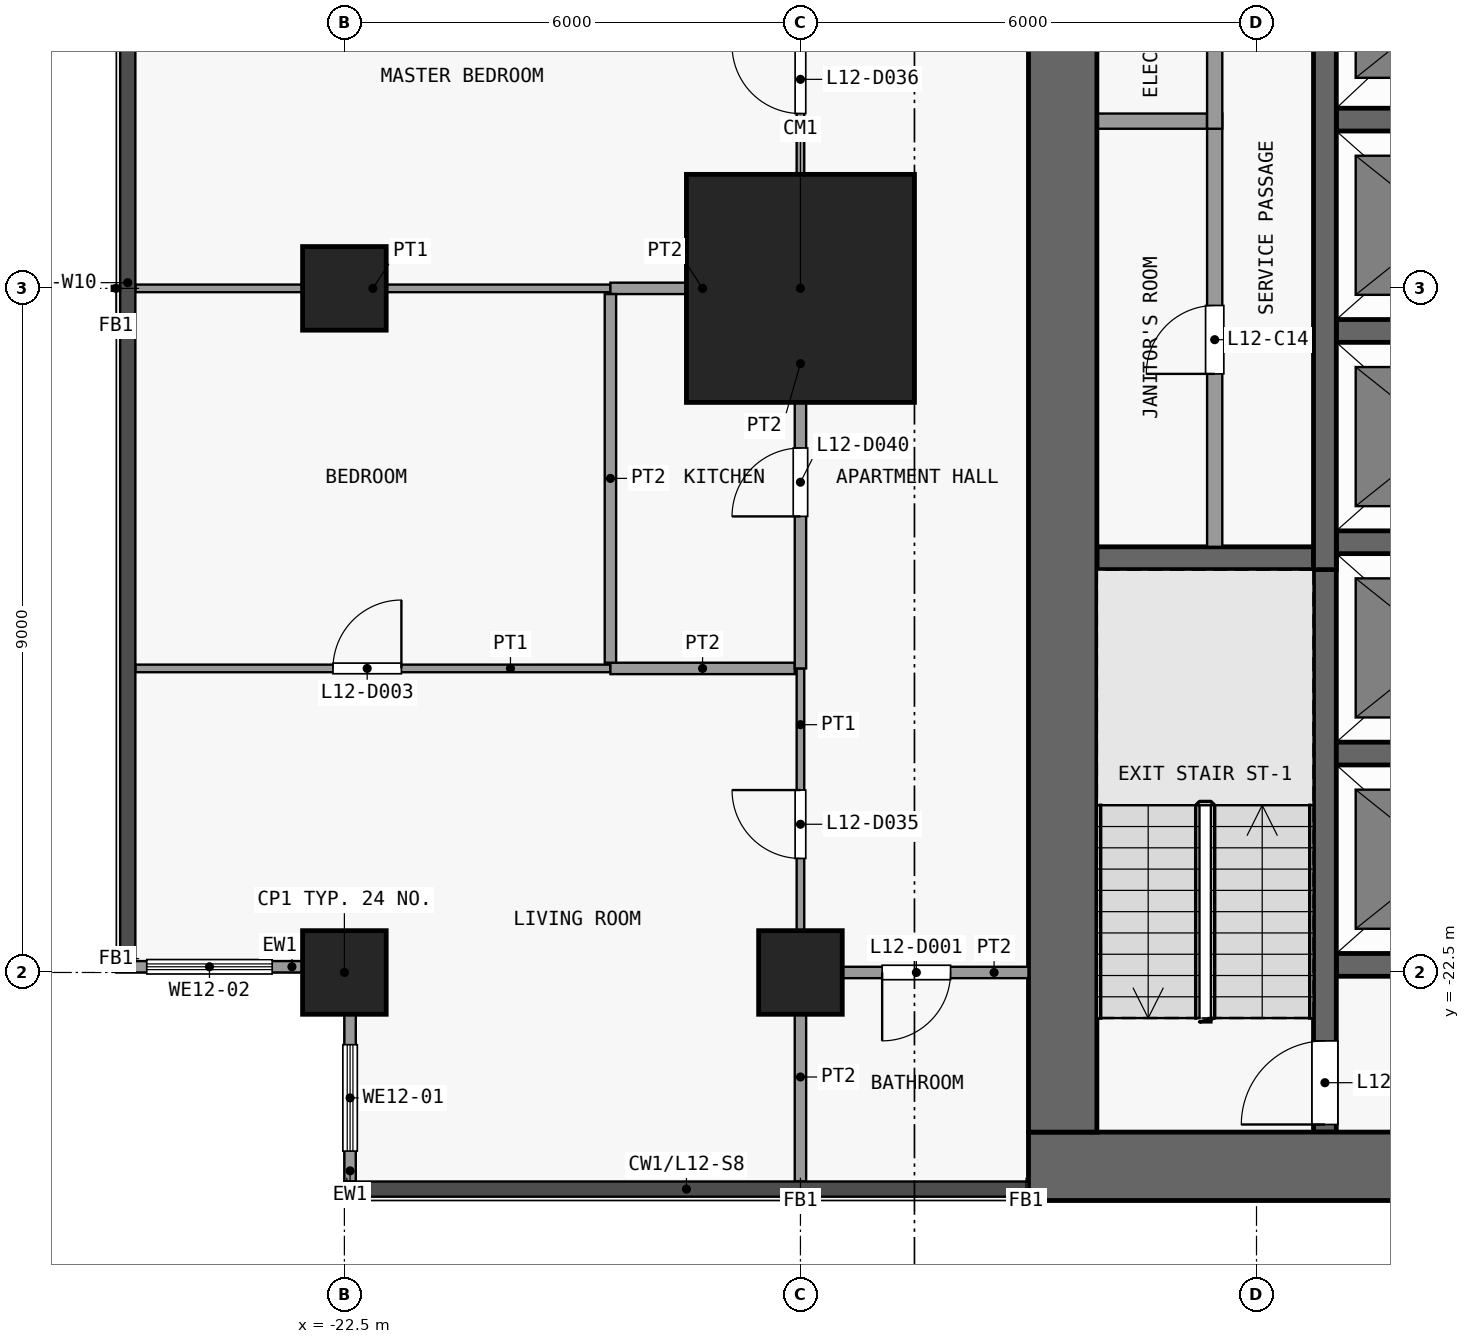
"""IFC4 building model, lengths in metres.
Left out: names, types, materials, properties, quantities, classifications, styles, units other than length and angle.
Written with IfcOpenShell. Run it as: python <this file> out.ifc"""

import sys

from ifc_helpers import new_model, si_unit, direction, frame, frame_2d, origin, origin_2d, place, context, subcontext, project, spatial, rectangle, extrude, element, fill, save


model = new_model("IFC4")
c1 = context("Model", 3, precision=1e-05, world=origin(), true_north=direction((0.0, 1.0)))
c2 = subcontext(c1, "Body", "Model", "MODEL_VIEW")
j1 = project(units=[si_unit("LENGTHUNIT", "METRE"), si_unit("PLANEANGLEUNIT", "RADIAN")], contexts=[c1])
p1 = place(None, origin())
s1 = spatial("IfcSite", under=j1, at=p1, CompositionType="ELEMENT")
p2 = place(p1, origin())
s2 = spatial("IfcBuilding", under=s1, at=p2, CompositionType="ELEMENT")
p3 = place(p2, frame((0.0, 0.0, 54.1)))
s3 = spatial("IfcBuildingStorey", under=s2, at=p3, CompositionType="ELEMENT", Elevation=54.1)
for number, where, z_axis, x_axis in (
    (1, (-22.5, -22.5, 0.0), (0.0, 0.0, 1.0), (1.0, 0.0, 0.0)),
    (2, (-22.5, -13.5, 0.0), (0.0, 0.0, 1.0), (1.0, 0.0, 0.0)),
    (3, (-16.5, -22.5, 0.0), (0.0, 0.0, 1.0), (1.0, 0.0, 0.0)),
):
    element("IfcColumn", number, at=place(p3, frame(where, z_axis=z_axis, x_axis=x_axis)), inside=s3, PredefinedType="COLUMN", context=c2, shape_type="SweptSolid", body=[
        extrude(rectangle(XDim=1.1, YDim=1.1, at=origin_2d()), origin(), (0.0, 0.0, 1.0), 3.6),
    ])
p4 = place(p3, frame((-16.5, -13.5, 0.0), z_axis=(0.0, 0.0, 1.0), x_axis=(1.0, 0.0, 0.0)))
e4 = element("IfcColumn", 4, at=p4, inside=s3, PredefinedType="COLUMN", context=c2, shape_type="SweptSolid", body=[
    extrude(rectangle(XDim=3.0, YDim=3.0, at=origin_2d()), origin(), (0.0, 0.0, 1.0), 3.6),
])
p5 = place(p3, frame((-13.5, -25.05, 0.0), z_axis=(0.0, 0.0, 1.0), x_axis=(1.0, 0.0, 0.0)))
e5 = element("IfcWall", 5, at=p5, inside=s3, PredefinedType="SHEAR", context=c2, shape_type="SweptSolid", body=[
    extrude(rectangle(XDim=27.0, YDim=0.9, at=frame_2d((13.5, 0.0))), origin(), (0.0, 0.0, 1.0), 3.3),
])
p6 = place(p3, frame((-13.05, -24.6, 0.0), z_axis=(0.0, 0.0, 1.0), x_axis=(0.0, 1.0, 0.0)))
e6 = element("IfcWall", 6, at=p6, inside=s3, PredefinedType="SHEAR", context=c2, shape_type="SweptSolid", body=[
    extrude(rectangle(XDim=16.1, YDim=0.9, at=frame_2d((8.05, 0.0))), origin(), (0.0, 0.0, 1.0), 3.3),
])
for number, where, z_axis, x_axis in (
    (7, (-9.45, -22.4, 0.0), (0.0, 0.0, 1.0), (1.0, 0.0, 0.0)),
    (8, (-9.45, -19.62, 0.0), (0.0, 0.0, 1.0), (1.0, 0.0, 0.0)),
):
    element("IfcWall", number, at=place(p3, frame(where, z_axis=z_axis, x_axis=x_axis)), inside=s3, PredefinedType="SHEAR", context=c2, shape_type="SweptSolid", body=[
        extrude(rectangle(XDim=2.8, YDim=0.3, at=frame_2d((1.4, 0.0))), origin(), (0.0, 0.0, 1.0), 3.3),
    ])
p7 = place(p3, frame((-12.6, -17.05, 0.0), z_axis=(0.0, 0.0, 1.0), x_axis=(1.0, 0.0, 0.0)))
e9 = element("IfcWall", 9, at=p7, inside=s3, PredefinedType="SHEAR", context=c2, shape_type="SweptSolid", body=[
    extrude(rectangle(XDim=2.85, YDim=0.3, at=frame_2d((1.425, 0.0))), origin(), (0.0, 0.0, 1.0), 3.3),
])
for number, where, z_axis, x_axis in (
    (10, (-9.45, -16.84, 0.0), (0.0, 0.0, 1.0), (1.0, 0.0, 0.0)),
    (11, (-9.45, -14.06, 0.0), (0.0, 0.0, 1.0), (1.0, 0.0, 0.0)),
):
    element("IfcWall", number, at=place(p3, frame(where, z_axis=z_axis, x_axis=x_axis)), inside=s3, PredefinedType="SHEAR", context=c2, shape_type="SweptSolid", body=[
        extrude(rectangle(XDim=2.8, YDim=0.3, at=frame_2d((1.4, 0.0))), origin(), (0.0, 0.0, 1.0), 3.3),
    ])
p8 = place(p3, frame((-12.6, -11.3, 0.0), z_axis=(0.0, 0.0, 1.0), x_axis=(1.0, 0.0, 0.0)))
e12 = element("IfcWall", 12, at=p8, inside=s3, PredefinedType="PARTITIONING", context=c2, shape_type="SweptSolid", body=[
    extrude(rectangle(XDim=1.45, YDim=0.2, at=frame_2d((0.725, 0.0))), origin(), (0.0, 0.0, 1.0), 3.3),
])
p9 = place(p3, frame((-9.45, -11.28, 0.0), z_axis=(0.0, 0.0, 1.0), x_axis=(1.0, 0.0, 0.0)))
e13 = element("IfcWall", 13, at=p9, inside=s3, PredefinedType="SHEAR", context=c2, shape_type="SweptSolid", body=[
    extrude(rectangle(XDim=2.8, YDim=0.3, at=frame_2d((1.4, 0.0))), origin(), (0.0, 0.0, 1.0), 3.3),
])
p10 = place(p3, frame((-11.05, -16.9, 0.0), z_axis=(0.0, 0.0, 1.0), x_axis=(0.0, 1.0, 0.0)))
e14 = element("IfcWall", 14, at=p10, inside=s3, PredefinedType="PARTITIONING", context=c2, shape_type="SweptSolid", body=[
    extrude(rectangle(XDim=5.7, YDim=0.2, at=frame_2d((2.85, 0.0))), origin(), (0.0, 0.0, 1.0), 3.3),
])
p11 = place(p10, frame((2.275, 0.0, 0.0)))
e15 = element("IfcOpeningElement", 15, at=p11, cuts=e14, PredefinedType="OPENING", context=c2, shape_type="SweptSolid", body=[
    extrude(rectangle(XDim=0.9, YDim=2.1, at=frame_2d((0.45, 1.05))), frame((0.0, 0.11, 0.0), z_axis=(0.0, -1.0, 0.0), x_axis=(1.0, 0.0, 0.0)), (0.0, 0.0, 1.0), 0.22),
])
p12 = place(p3, frame((-11.05, -11.4, 0.0), z_axis=(0.0, 0.0, 1.0), x_axis=(0.0, 1.0, 0.0)))
e16 = element("IfcWall", 16, at=p12, inside=s3, PredefinedType="PARTITIONING", context=c2, shape_type="SweptSolid", body=[
    extrude(rectangle(XDim=2.9, YDim=0.2, at=frame_2d((1.45, 0.0))), origin(), (0.0, 0.0, 1.0), 3.3),
])
p13 = place(p12, frame((1.05, 0.0, 0.0)))
e17 = element("IfcOpeningElement", 17, at=p13, cuts=e16, PredefinedType="OPENING", context=c2, shape_type="SweptSolid", body=[
    extrude(rectangle(XDim=0.9, YDim=2.1, at=frame_2d((0.45, 1.05))), frame((0.0, 0.11, 0.0), z_axis=(0.0, -1.0, 0.0), x_axis=(1.0, 0.0, 0.0)), (0.0, 0.0, 1.0), 0.22),
])
p14 = place(p3, frame((-9.6, -24.6, 0.0), z_axis=(0.0, 0.0, 1.0), x_axis=(0.0, 1.0, 0.0)))
e18 = element("IfcWall", 18, at=p14, inside=s3, PredefinedType="SHEAR", context=c2, shape_type="SweptSolid", body=[
    extrude(rectangle(XDim=7.7, YDim=0.3, at=frame_2d((3.85, 0.0))), origin(), (0.0, 0.0, 1.0), 3.3),
])
p15 = place(p14, frame((0.1, 0.0, 0.0)))
e19 = element("IfcOpeningElement", 19, at=p15, cuts=e18, PredefinedType="OPENING", context=c2, shape_type="SweptSolid", body=[
    extrude(rectangle(XDim=1.1, YDim=2.1, at=frame_2d((0.55, 1.05))), frame((0.0, 0.16, 0.0), z_axis=(0.0, -1.0, 0.0), x_axis=(1.0, 0.0, 0.0)), (0.0, 0.0, 1.0), 0.32),
])
p16 = place(p3, frame((-9.6, -17.2, 0.0), z_axis=(0.0, 0.0, 1.0), x_axis=(0.0, 1.0, 0.0)))
e20 = element("IfcWall", 20, at=p16, inside=s3, PredefinedType="SHEAR", context=c2, shape_type="SweptSolid", body=[
    extrude(rectangle(XDim=8.7, YDim=0.3, at=frame_2d((4.35, 0.0))), origin(), (0.0, 0.0, 1.0), 3.3),
])
p17 = place(p3, frame((-22.425, -25.25, 0.0), z_axis=(0.0, 0.0, 1.0), x_axis=(0.0, 1.0, 0.0)))
e21 = element("IfcWall", 21, at=p17, inside=s3, PredefinedType="SOLIDWALL", context=c2, shape_type="SweptSolid", body=[
    extrude(rectangle(XDim=2.2, YDim=0.15, at=frame_2d((1.1, 0.0))), origin(), (0.0, 0.0, 1.0), 3.3),
])
p18 = place(p17, frame((0.4, 0.0, 0.9)))
e22 = element("IfcOpeningElement", 22, at=p18, cuts=e21, PredefinedType="OPENING", context=c2, shape_type="SweptSolid", body=[
    extrude(rectangle(XDim=1.4, YDim=2.4, at=frame_2d((0.7, 1.2))), frame((0.0, 0.085, 0.0), z_axis=(0.0, -1.0, 0.0), x_axis=(1.0, 0.0, 0.0)), (0.0, 0.0, 1.0), 0.17),
])
p19 = place(p3, frame((-23.05, -22.425, 0.0), z_axis=(0.0, 0.0, 1.0), x_axis=(-1.0, 0.0, 0.0)))
e23 = element("IfcWall", 23, at=p19, inside=s3, PredefinedType="SOLIDWALL", context=c2, shape_type="SweptSolid", body=[
    extrude(rectangle(XDim=2.45, YDim=0.15, at=frame_2d((1.225, 0.0))), origin(), (0.0, 0.0, 1.0), 3.3),
])
p20 = place(p19, frame((0.4, 0.0, 0.9)))
e24 = element("IfcOpeningElement", 24, at=p20, cuts=e23, PredefinedType="OPENING", context=c2, shape_type="SweptSolid", body=[
    extrude(rectangle(XDim=1.65, YDim=2.4, at=frame_2d((0.825, 1.2))), frame((0.0, 0.085, 0.0), z_axis=(0.0, -1.0, 0.0), x_axis=(1.0, 0.0, 0.0)), (0.0, 0.0, 1.0), 0.17),
])
p21 = place(p3, frame((-16.425, -22.5, 0.0), z_axis=(0.0, 0.0, 1.0), x_axis=(1.0, 0.0, 0.0)))
e25 = element("IfcWall", 25, at=p21, inside=s3, PredefinedType="PARTITIONING", context=c2, shape_type="SweptSolid", body=[
    extrude(rectangle(XDim=2.925, YDim=0.15, at=frame_2d((1.462, 0.0))), origin(), (0.0, 0.0, 1.0), 3.3),
])
p22 = place(p21, frame((1.0, 0.0, 0.0)))
e26 = element("IfcOpeningElement", 26, at=p22, cuts=e25, PredefinedType="OPENING", context=c2, shape_type="SweptSolid", body=[
    extrude(rectangle(XDim=0.9, YDim=2.1, at=frame_2d((0.45, 1.05))), frame((0.0, 0.085, 0.0), z_axis=(0.0, -1.0, 0.0), x_axis=(1.0, 0.0, 0.0)), (0.0, 0.0, 1.0), 0.17),
])
p23 = place(p3, frame((-25.25, -18.5, 0.0), z_axis=(0.0, 0.0, 1.0), x_axis=(1.0, 0.0, 0.0)))
e27 = element("IfcWall", 27, at=p23, inside=s3, PredefinedType="PARTITIONING", context=c2, shape_type="SweptSolid", body=[
    extrude(rectangle(XDim=6.25, YDim=0.1, at=frame_2d((3.125, 0.0))), origin(), (0.0, 0.0, 1.0), 3.3),
])
p24 = place(p23, frame((2.6, 0.0, 0.0)))
e28 = element("IfcOpeningElement", 28, at=p24, cuts=e27, PredefinedType="OPENING", context=c2, shape_type="SweptSolid", body=[
    extrude(rectangle(XDim=0.9, YDim=2.1, at=frame_2d((0.45, 1.05))), frame((0.0, 0.06, 0.0), z_axis=(0.0, -1.0, 0.0), x_axis=(1.0, 0.0, 0.0)), (0.0, 0.0, 1.0), 0.12),
])
p25 = place(p3, frame((-19.0, -18.5, 0.0), z_axis=(0.0, 0.0, 1.0), x_axis=(1.0, 0.0, 0.0)))
e29 = element("IfcWall", 29, at=p25, inside=s3, PredefinedType="PARTITIONING", context=c2, shape_type="SweptSolid", body=[
    extrude(rectangle(XDim=2.425, YDim=0.15, at=frame_2d((1.212, 0.0))), origin(), (0.0, 0.0, 1.0), 3.3),
])
p26 = place(p3, frame((-25.25, -13.5, 0.0), z_axis=(0.0, 0.0, 1.0), x_axis=(1.0, 0.0, 0.0)))
e30 = element("IfcWall", 30, at=p26, inside=s3, PredefinedType="PARTITIONING", context=c2, shape_type="SweptSolid", body=[
    extrude(rectangle(XDim=6.25, YDim=0.1, at=frame_2d((3.125, 0.0))), origin(), (0.0, 0.0, 1.0), 3.3),
])
p27 = place(p3, frame((-19.0, -13.5, 0.0), z_axis=(0.0, 0.0, 1.0), x_axis=(1.0, 0.0, 0.0)))
e31 = element("IfcWall", 31, at=p27, inside=s3, PredefinedType="PARTITIONING", context=c2, shape_type="SweptSolid", body=[
    extrude(rectangle(XDim=2.425, YDim=0.15, at=frame_2d((1.212, 0.0))), origin(), (0.0, 0.0, 1.0), 3.3),
])
p28 = place(p3, frame((-19.0, -18.425, 0.0), z_axis=(0.0, 0.0, 1.0), x_axis=(0.0, 1.0, 0.0)))
e32 = element("IfcWall", 32, at=p28, inside=s3, PredefinedType="PARTITIONING", context=c2, shape_type="SweptSolid", body=[
    extrude(rectangle(XDim=4.85, YDim=0.15, at=frame_2d((2.425, 0.0))), origin(), (0.0, 0.0, 1.0), 3.3),
])
p29 = place(p3, frame((-16.5, -22.5, 0.0), z_axis=(0.0, 0.0, 1.0), x_axis=(0.0, 1.0, 0.0)))
e33 = element("IfcWall", 33, at=p29, inside=s3, PredefinedType="PARTITIONING", context=c2, shape_type="SweptSolid", body=[
    extrude(rectangle(XDim=4.0, YDim=0.1, at=frame_2d((2.0, 0.0))), origin(), (0.0, 0.0, 1.0), 3.3),
])
p30 = place(p29, frame((1.5, 0.0, 0.0)))
e34 = element("IfcOpeningElement", 34, at=p30, cuts=e33, PredefinedType="OPENING", context=c2, shape_type="SweptSolid", body=[
    extrude(rectangle(XDim=0.9, YDim=2.1, at=frame_2d((0.45, 1.05))), frame((0.0, 0.06, 0.0), z_axis=(0.0, -1.0, 0.0), x_axis=(1.0, 0.0, 0.0)), (0.0, 0.0, 1.0), 0.12),
])
p31 = place(p3, frame((-16.5, -13.5, 0.0), z_axis=(0.0, 0.0, 1.0), x_axis=(0.0, 1.0, 0.0)))
e35 = element("IfcWall", 35, at=p31, inside=s3, PredefinedType="PARTITIONING", context=c2, shape_type="SweptSolid", body=[
    extrude(rectangle(XDim=5.5, YDim=0.1, at=frame_2d((2.75, 0.0))), origin(), (0.0, 0.0, 1.0), 3.3),
])
p32 = place(p31, frame((2.3, 0.0, 0.0)))
e36 = element("IfcOpeningElement", 36, at=p32, cuts=e35, PredefinedType="OPENING", context=c2, shape_type="SweptSolid", body=[
    extrude(rectangle(XDim=0.9, YDim=2.1, at=frame_2d((0.45, 1.05))), frame((0.0, 0.06, 0.0), z_axis=(0.0, -1.0, 0.0), x_axis=(1.0, 0.0, 0.0)), (0.0, 0.0, 1.0), 0.12),
])
p33 = place(p3, frame((-16.5, -25.25, 0.0), z_axis=(0.0, 0.0, 1.0), x_axis=(0.0, 1.0, 0.0)))
e37 = element("IfcWall", 37, at=p33, inside=s3, PredefinedType="PARTITIONING", context=c2, shape_type="SweptSolid", body=[
    extrude(rectangle(XDim=2.75, YDim=0.15, at=frame_2d((1.375, 0.0))), origin(), (0.0, 0.0, 1.0), 3.3),
])
p34 = place(p3, frame((-16.5, -18.5, 0.0), z_axis=(0.0, 0.0, 1.0), x_axis=(0.0, 1.0, 0.0)))
e38 = element("IfcWall", 38, at=p34, inside=s3, PredefinedType="PARTITIONING", context=c2, shape_type="SweptSolid", body=[
    extrude(rectangle(XDim=5.0, YDim=0.15, at=frame_2d((2.5, 0.0))), origin(), (0.0, 0.0, 1.0), 3.3),
])
p35 = place(p34, frame((2.0, 0.0, 0.0)))
e39 = element("IfcOpeningElement", 39, at=p35, cuts=e38, PredefinedType="OPENING", context=c2, shape_type="SweptSolid", body=[
    extrude(rectangle(XDim=0.9, YDim=2.1, at=frame_2d((0.45, 1.05))), frame((0.0, 0.085, 0.0), z_axis=(0.0, -1.0, 0.0), x_axis=(1.0, 0.0, 0.0)), (0.0, 0.0, 1.0), 0.17),
])
p36 = place(p11, origin())
e40 = element("IfcDoor", 40, at=p36, inside=s3, OperationType="SINGLE_SWING_LEFT", PredefinedType="DOOR", context=c2, shape_type="SweptSolid", body=[
    extrude(rectangle(XDim=0.9, YDim=2.1, at=frame_2d((0.45, 1.05))), frame((0.0, 0.025, 0.0), z_axis=(0.0, -1.0, 0.0), x_axis=(1.0, 0.0, 0.0)), (0.0, 0.0, 1.0), 0.05),
])
fill(e15, e40)
p37 = place(p15, origin())
e41 = element("IfcDoor", 41, at=p37, inside=s3, OperationType="SINGLE_SWING_LEFT", PredefinedType="DOOR", context=c2, shape_type="SweptSolid", body=[
    extrude(rectangle(XDim=1.1, YDim=2.1, at=frame_2d((0.55, 1.05))), frame((0.0, 0.025, 0.0), z_axis=(0.0, -1.0, 0.0), x_axis=(1.0, 0.0, 0.0)), (0.0, 0.0, 1.0), 0.05),
])
fill(e19, e41)
p38 = place(p18, origin())
e42 = element("IfcWindow", 42, at=p38, inside=s3, PartitioningType="SINGLE_PANEL", PredefinedType="WINDOW", context=c2, shape_type="SweptSolid", body=[
    extrude(rectangle(XDim=1.4, YDim=2.4, at=frame_2d((0.7, 1.2))), frame((0.0, 0.03, 0.0), z_axis=(0.0, -1.0, 0.0), x_axis=(1.0, 0.0, 0.0)), (0.0, 0.0, 1.0), 0.06),
])
fill(e22, e42)
p39 = place(p20, origin())
e43 = element("IfcWindow", 43, at=p39, inside=s3, PartitioningType="SINGLE_PANEL", PredefinedType="WINDOW", context=c2, shape_type="SweptSolid", body=[
    extrude(rectangle(XDim=1.65, YDim=2.4, at=frame_2d((0.825, 1.2))), frame((0.0, 0.03, 0.0), z_axis=(0.0, -1.0, 0.0), x_axis=(1.0, 0.0, 0.0)), (0.0, 0.0, 1.0), 0.06),
])
fill(e24, e43)
p40 = place(p22, origin())
e44 = element("IfcDoor", 44, at=p40, inside=s3, OperationType="SINGLE_SWING_LEFT", PredefinedType="DOOR", context=c2, shape_type="SweptSolid", body=[
    extrude(rectangle(XDim=0.9, YDim=2.1, at=frame_2d((0.45, 1.05))), frame((0.0, 0.025, 0.0), z_axis=(0.0, -1.0, 0.0), x_axis=(1.0, 0.0, 0.0)), (0.0, 0.0, 1.0), 0.05),
])
fill(e26, e44)
p41 = place(p24, origin())
e45 = element("IfcDoor", 45, at=p41, inside=s3, OperationType="SINGLE_SWING_LEFT", PredefinedType="DOOR", context=c2, shape_type="SweptSolid", body=[
    extrude(rectangle(XDim=0.9, YDim=2.1, at=frame_2d((0.45, 1.05))), frame((0.0, 0.025, 0.0), z_axis=(0.0, -1.0, 0.0), x_axis=(1.0, 0.0, 0.0)), (0.0, 0.0, 1.0), 0.05),
])
fill(e28, e45)
p42 = place(p30, origin())
e46 = element("IfcDoor", 46, at=p42, inside=s3, OperationType="SINGLE_SWING_LEFT", PredefinedType="DOOR", context=c2, shape_type="SweptSolid", body=[
    extrude(rectangle(XDim=0.9, YDim=2.1, at=frame_2d((0.45, 1.05))), frame((0.0, 0.025, 0.0), z_axis=(0.0, -1.0, 0.0), x_axis=(1.0, 0.0, 0.0)), (0.0, 0.0, 1.0), 0.05),
])
fill(e34, e46)
p43 = place(p32, origin())
e47 = element("IfcDoor", 47, at=p43, inside=s3, OperationType="SINGLE_SWING_LEFT", PredefinedType="DOOR", context=c2, shape_type="SweptSolid", body=[
    extrude(rectangle(XDim=0.9, YDim=2.1, at=frame_2d((0.45, 1.05))), frame((0.0, 0.025, 0.0), z_axis=(0.0, -1.0, 0.0), x_axis=(1.0, 0.0, 0.0)), (0.0, 0.0, 1.0), 0.05),
])
fill(e36, e47)
p44 = place(p35, origin())
e48 = element("IfcDoor", 48, at=p44, inside=s3, OperationType="SINGLE_SWING_RIGHT", PredefinedType="DOOR", context=c2, shape_type="SweptSolid", body=[
    extrude(rectangle(XDim=0.9, YDim=2.1, at=frame_2d((0.45, 1.05))), frame((0.0, 0.025, 0.0), z_axis=(0.0, -1.0, 0.0), x_axis=(1.0, 0.0, 0.0)), (0.0, 0.0, 1.0), 0.05),
])
fill(e39, e48)
save(model, sys.argv[1])
